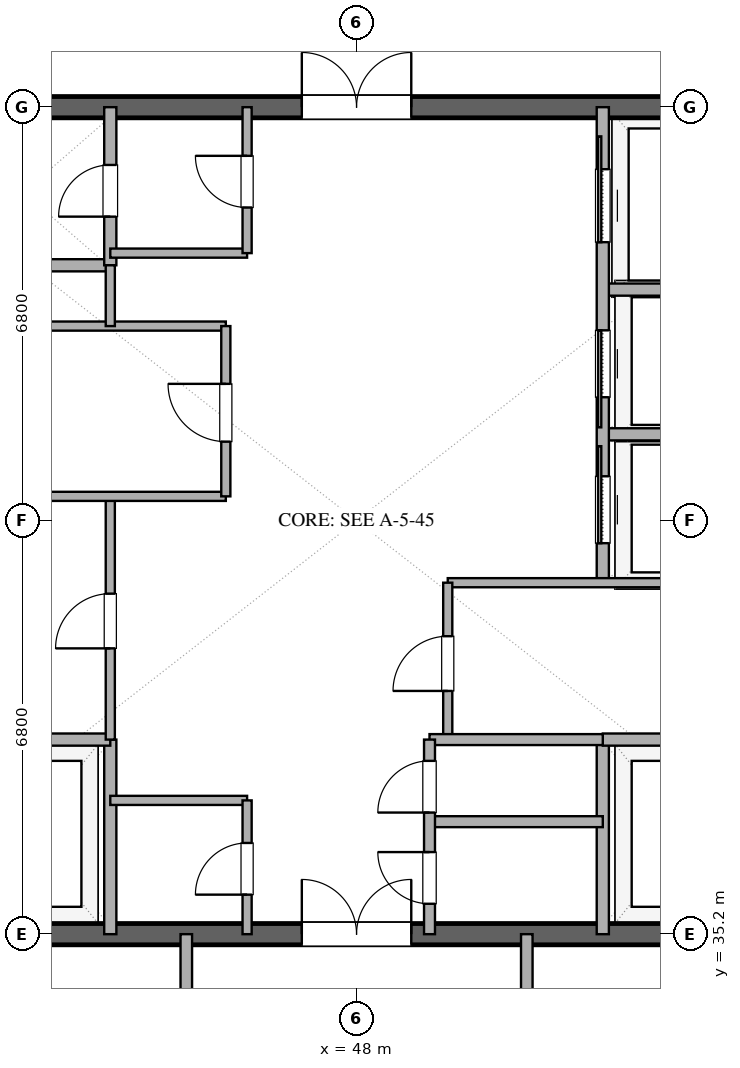
"""IFC4 building model, lengths in metres.
Left out: names, types, materials, properties, quantities, classifications, styles, units other than length and angle.
Written with IfcOpenShell. Run it as: python <this file> out.ifc"""

import sys

from ifc_helpers import new_model, si_unit, direction, frame, frame_2d, origin, place, context, subcontext, project, spatial, rectangle, extrude, element, fill, save


model = new_model("IFC4")
c1 = context("Model", 3, precision=1e-05, world=origin(), true_north=direction((0.0, 1.0)))
c2 = subcontext(c1, "Body", "Model", "MODEL_VIEW")
j1 = project(units=[si_unit("LENGTHUNIT", "METRE"), si_unit("PLANEANGLEUNIT", "RADIAN")], contexts=[c1])
p1 = place(None, origin())
s1 = spatial("IfcSite", under=j1, at=p1, CompositionType="ELEMENT")
p2 = place(p1, origin())
s2 = spatial("IfcBuilding", under=s1, at=p2, CompositionType="ELEMENT")
p3 = place(p2, frame((0.0, 0.0, 312.6)))
s3 = spatial("IfcBuildingStorey", under=s2, at=p3, CompositionType="ELEMENT", Elevation=312.6)
p4 = place(p3, frame((41.0, 35.2, 0.0), z_axis=(0.0, 0.0, 1.0), x_axis=(1.0, 0.0, 0.0)))
e1 = element("IfcWall", 1, at=p4, inside=s3, PredefinedType="SHEAR", context=c2, shape_type="SweptSolid", body=[
    extrude(rectangle(XDim=14.0, YDim=0.35, at=frame_2d((7.0, 0.0))), origin(), (0.0, 0.0, 1.0), 3.64),
])
p5 = place(p4, frame((6.1, 0.0, 0.0)))
e2 = element("IfcOpeningElement", 2, at=p5, cuts=e1, PredefinedType="OPENING", context=c2, shape_type="SweptSolid", body=[
    extrude(rectangle(XDim=1.8, YDim=2.25, at=frame_2d((0.9, 1.125))), frame((0.0, 0.185, 0.0), z_axis=(0.0, -1.0, 0.0), x_axis=(1.0, 0.0, 0.0)), (0.0, 0.0, 1.0), 0.37),
])
p6 = place(p3, frame((41.0, 48.8, 0.0), z_axis=(0.0, 0.0, 1.0), x_axis=(1.0, 0.0, 0.0)))
e3 = element("IfcWall", 3, at=p6, inside=s3, PredefinedType="SHEAR", context=c2, shape_type="SweptSolid", body=[
    extrude(rectangle(XDim=14.0, YDim=0.35, at=frame_2d((7.0, 0.0))), origin(), (0.0, 0.0, 1.0), 3.64),
])
p7 = place(p6, frame((6.1, 0.0, 0.0)))
e4 = element("IfcOpeningElement", 4, at=p7, cuts=e3, PredefinedType="OPENING", context=c2, shape_type="SweptSolid", body=[
    extrude(rectangle(XDim=1.8, YDim=2.25, at=frame_2d((0.9, 1.125))), frame((0.0, 0.185, 0.0), z_axis=(0.0, -1.0, 0.0), x_axis=(1.0, 0.0, 0.0)), (0.0, 0.0, 1.0), 0.37),
])
p8 = place(p3, frame((43.95, 35.2, 0.0), z_axis=(0.0, 0.0, 1.0), x_axis=(0.0, 1.0, 0.0)))
e5 = element("IfcWall", 5, at=p8, inside=s3, PredefinedType="SOLIDWALL", context=c2, shape_type="SweptSolid", body=[
    extrude(rectangle(XDim=3.2, YDim=0.2, at=frame_2d((1.6, 0.0))), origin(), (0.0, 0.0, 1.0), 2.34),
])
p9 = place(p3, frame((41.0, 38.4, 0.0), z_axis=(0.0, 0.0, 1.0), x_axis=(1.0, 0.0, 0.0)))
e6 = element("IfcWall", 6, at=p9, inside=s3, PredefinedType="SOLIDWALL", context=c2, shape_type="SweptSolid", body=[
    extrude(rectangle(XDim=2.95, YDim=0.2, at=frame_2d((1.475, 0.0))), origin(), (0.0, 0.0, 1.0), 2.34),
])
p10 = place(p3, frame((52.05, 35.2, 0.0), z_axis=(0.0, 0.0, 1.0), x_axis=(0.0, 1.0, 0.0)))
e7 = element("IfcWall", 7, at=p10, inside=s3, PredefinedType="SOLIDWALL", context=c2, shape_type="SweptSolid", body=[
    extrude(rectangle(XDim=3.2, YDim=0.2, at=frame_2d((1.6, 0.0))), origin(), (0.0, 0.0, 1.0), 2.34),
])
for number, where, z_axis, x_axis in (
    (8, (52.05, 38.4, 0.0), (0.0, 0.0, 1.0), (1.0, 0.0, 0.0)),
    (9, (41.0, 46.2, 0.0), (0.0, 0.0, 1.0), (1.0, 0.0, 0.0)),
):
    element("IfcWall", number, at=place(p3, frame(where, z_axis=z_axis, x_axis=x_axis)), inside=s3, PredefinedType="SOLIDWALL", context=c2, shape_type="SweptSolid", body=[
        extrude(rectangle(XDim=2.95, YDim=0.2, at=frame_2d((1.475, 0.0))), origin(), (0.0, 0.0, 1.0), 2.34),
    ])
p11 = place(p3, frame((43.95, 46.2, 0.0), z_axis=(0.0, 0.0, 1.0), x_axis=(0.0, 1.0, 0.0)))
e10 = element("IfcWall", 10, at=p11, inside=s3, PredefinedType="SOLIDWALL", context=c2, shape_type="SweptSolid", body=[
    extrude(rectangle(XDim=2.6, YDim=0.2, at=frame_2d((1.3, 0.0))), origin(), (0.0, 0.0, 1.0), 2.34),
])
p12 = place(p11, frame((0.8, 0.0, 0.0)))
e11 = element("IfcOpeningElement", 11, at=p12, cuts=e10, PredefinedType="OPENING", context=c2, shape_type="SweptSolid", body=[
    extrude(rectangle(XDim=0.85, YDim=2.15, at=frame_2d((0.425, 1.075))), frame((0.0, 0.11, 0.0), z_axis=(0.0, -1.0, 0.0), x_axis=(1.0, 0.0, 0.0)), (0.0, 0.0, 1.0), 0.22),
])
p13 = place(p3, frame((43.95, 38.4, 0.0), z_axis=(0.0, 0.0, 1.0), x_axis=(0.0, 1.0, 0.0)))
e12 = element("IfcWall", 12, at=p13, inside=s3, PredefinedType="PARTITIONING", context=c2, shape_type="SweptSolid", body=[
    extrude(rectangle(XDim=4.0, YDim=0.15, at=frame_2d((2.0, 0.0))), origin(), (0.0, 0.0, 1.0), 2.34),
])
p14 = place(p13, frame((1.5, 0.0, 0.0)))
e13 = element("IfcOpeningElement", 13, at=p14, cuts=e12, PredefinedType="OPENING", context=c2, shape_type="SweptSolid", body=[
    extrude(rectangle(XDim=0.9, YDim=2.15, at=frame_2d((0.45, 1.075))), frame((0.0, 0.085, 0.0), z_axis=(0.0, -1.0, 0.0), x_axis=(1.0, 0.0, 0.0)), (0.0, 0.0, 1.0), 0.17),
])
p15 = place(p3, frame((41.0, 42.4, 0.0), z_axis=(0.0, 0.0, 1.0), x_axis=(1.0, 0.0, 0.0)))
e14 = element("IfcWall", 14, at=p15, inside=s3, PredefinedType="PARTITIONING", context=c2, shape_type="SweptSolid", body=[
    extrude(rectangle(XDim=4.85, YDim=0.15, at=frame_2d((2.425, 0.0))), origin(), (0.0, 0.0, 1.0), 2.04),
])
p16 = place(p3, frame((41.0, 45.2, 0.0), z_axis=(0.0, 0.0, 1.0), x_axis=(1.0, 0.0, 0.0)))
e15 = element("IfcWall", 15, at=p16, inside=s3, PredefinedType="PARTITIONING", context=c2, shape_type="SweptSolid", body=[
    extrude(rectangle(XDim=4.85, YDim=0.15, at=frame_2d((2.425, 0.0))), origin(), (0.0, 0.0, 1.0), 2.34),
])
p17 = place(p3, frame((43.95, 45.2, 0.0), z_axis=(0.0, 0.0, 1.0), x_axis=(0.0, 1.0, 0.0)))
e16 = element("IfcWall", 16, at=p17, inside=s3, PredefinedType="PARTITIONING", context=c2, shape_type="SweptSolid", body=[
    extrude(rectangle(XDim=1.0, YDim=0.15, at=frame_2d((0.5, 0.0))), origin(), (0.0, 0.0, 1.0), 2.34),
])
p18 = place(p3, frame((45.85, 42.4, 0.0), z_axis=(0.0, 0.0, 1.0), x_axis=(0.0, 1.0, 0.0)))
e17 = element("IfcWall", 17, at=p18, inside=s3, PredefinedType="PARTITIONING", context=c2, shape_type="SweptSolid", body=[
    extrude(rectangle(XDim=2.8, YDim=0.15, at=frame_2d((1.4, 0.0))), origin(), (0.0, 0.0, 1.0), 2.34),
])
p19 = place(p18, frame((0.9, 0.0, 0.0)))
e18 = element("IfcOpeningElement", 18, at=p19, cuts=e17, PredefinedType="OPENING", context=c2, shape_type="SweptSolid", body=[
    extrude(rectangle(XDim=0.95, YDim=2.15, at=frame_2d((0.475, 1.075))), frame((0.0, 0.085, 0.0), z_axis=(0.0, -1.0, 0.0), x_axis=(1.0, 0.0, 0.0)), (0.0, 0.0, 1.0), 0.17),
])
for number, where, z_axis, x_axis in (
    (19, (52.05, 43.42, 0.0), (0.0, 0.0, 1.0), (1.0, 0.0, 0.0)),
    (20, (52.05, 45.8, 0.0), (0.0, 0.0, 1.0), (1.0, 0.0, 0.0)),
):
    element("IfcWall", number, at=place(p3, frame(where, z_axis=z_axis, x_axis=x_axis)), inside=s3, PredefinedType="SOLIDWALL", context=c2, shape_type="SweptSolid", body=[
        extrude(rectangle(XDim=2.95, YDim=0.2, at=frame_2d((1.475, 0.0))), origin(), (0.0, 0.0, 1.0), 2.34),
    ])
p20 = place(p3, frame((52.05, 40.98, 0.0), z_axis=(0.0, 0.0, 1.0), x_axis=(0.0, 1.0, 0.0)))
e21 = element("IfcWall", 21, at=p20, inside=s3, PredefinedType="SOLIDWALL", context=c2, shape_type="SweptSolid", body=[
    extrude(rectangle(XDim=7.82, YDim=0.2, at=frame_2d((3.91, 0.0))), origin(), (0.0, 0.0, 1.0), 2.34),
])
p21 = place(p20, frame((0.65, 0.0, 0.0)))
e22 = element("IfcOpeningElement", 22, at=p21, cuts=e21, PredefinedType="OPENING", context=c2, shape_type="SweptSolid", body=[
    extrude(rectangle(XDim=1.1, YDim=2.2, at=frame_2d((0.55, 1.1))), frame((0.0, 0.11, 0.0), z_axis=(0.0, -1.0, 0.0), x_axis=(1.0, 0.0, 0.0)), (0.0, 0.0, 1.0), 0.22),
])
p22 = place(p20, frame((3.05, 0.0, 0.0)))
e23 = element("IfcOpeningElement", 23, at=p22, cuts=e21, PredefinedType="OPENING", context=c2, shape_type="SweptSolid", body=[
    extrude(rectangle(XDim=1.1, YDim=2.2, at=frame_2d((0.55, 1.1))), frame((0.0, 0.11, 0.0), z_axis=(0.0, -1.0, 0.0), x_axis=(1.0, 0.0, 0.0)), (0.0, 0.0, 1.0), 0.22),
])
p23 = place(p20, frame((5.6, 0.0, 0.0)))
e24 = element("IfcOpeningElement", 24, at=p23, cuts=e21, PredefinedType="OPENING", context=c2, shape_type="SweptSolid", body=[
    extrude(rectangle(XDim=1.2, YDim=2.2, at=frame_2d((0.6, 1.1))), frame((0.0, 0.11, 0.0), z_axis=(0.0, -1.0, 0.0), x_axis=(1.0, 0.0, 0.0)), (0.0, 0.0, 1.0), 0.22),
])
p24 = place(p3, frame((49.5, 40.98, 0.0), z_axis=(0.0, 0.0, 1.0), x_axis=(1.0, 0.0, 0.0)))
e25 = element("IfcWall", 25, at=p24, inside=s3, PredefinedType="PARTITIONING", context=c2, shape_type="SweptSolid", body=[
    extrude(rectangle(XDim=5.5, YDim=0.15, at=frame_2d((2.75, 0.0))), origin(), (0.0, 0.0, 1.0), 2.34),
])
p25 = place(p3, frame((49.5, 38.4, 0.0), z_axis=(0.0, 0.0, 1.0), x_axis=(0.0, 1.0, 0.0)))
e26 = element("IfcWall", 26, at=p25, inside=s3, PredefinedType="PARTITIONING", context=c2, shape_type="SweptSolid", body=[
    extrude(rectangle(XDim=2.58, YDim=0.15, at=frame_2d((1.29, 0.0))), origin(), (0.0, 0.0, 1.0), 2.34),
])
p26 = place(p25, frame((0.8, 0.0, 0.0)))
e27 = element("IfcOpeningElement", 27, at=p26, cuts=e26, PredefinedType="OPENING", context=c2, shape_type="SweptSolid", body=[
    extrude(rectangle(XDim=0.9, YDim=2.15, at=frame_2d((0.45, 1.075))), frame((0.0, 0.085, 0.0), z_axis=(0.0, -1.0, 0.0), x_axis=(1.0, 0.0, 0.0)), (0.0, 0.0, 1.0), 0.17),
])
p27 = place(p3, frame((43.95, 37.4, 0.0), z_axis=(0.0, 0.0, 1.0), x_axis=(1.0, 0.0, 0.0)))
e28 = element("IfcWall", 28, at=p27, inside=s3, PredefinedType="PARTITIONING", context=c2, shape_type="SweptSolid", body=[
    extrude(rectangle(XDim=2.25, YDim=0.15, at=frame_2d((1.125, 0.0))), origin(), (0.0, 0.0, 1.0), 2.34),
])
p28 = place(p3, frame((46.2, 35.2, 0.0), z_axis=(0.0, 0.0, 1.0), x_axis=(0.0, 1.0, 0.0)))
e29 = element("IfcWall", 29, at=p28, inside=s3, PredefinedType="PARTITIONING", context=c2, shape_type="SweptSolid", body=[
    extrude(rectangle(XDim=2.2, YDim=0.15, at=frame_2d((1.1, 0.0))), origin(), (0.0, 0.0, 1.0), 2.34),
])
p29 = place(p28, frame((0.65, 0.0, 0.0)))
e30 = element("IfcOpeningElement", 30, at=p29, cuts=e29, PredefinedType="OPENING", context=c2, shape_type="SweptSolid", body=[
    extrude(rectangle(XDim=0.85, YDim=2.15, at=frame_2d((0.425, 1.075))), frame((0.0, 0.085, 0.0), z_axis=(0.0, -1.0, 0.0), x_axis=(1.0, 0.0, 0.0)), (0.0, 0.0, 1.0), 0.17),
])
p30 = place(p3, frame((43.95, 46.4, 0.0), z_axis=(0.0, 0.0, 1.0), x_axis=(1.0, 0.0, 0.0)))
e31 = element("IfcWall", 31, at=p30, inside=s3, PredefinedType="PARTITIONING", context=c2, shape_type="SweptSolid", body=[
    extrude(rectangle(XDim=2.25, YDim=0.15, at=frame_2d((1.125, 0.0))), origin(), (0.0, 0.0, 1.0), 2.34),
])
p31 = place(p3, frame((46.2, 46.4, 0.0), z_axis=(0.0, 0.0, 1.0), x_axis=(0.0, 1.0, 0.0)))
e32 = element("IfcWall", 32, at=p31, inside=s3, PredefinedType="PARTITIONING", context=c2, shape_type="SweptSolid", body=[
    extrude(rectangle(XDim=2.4, YDim=0.15, at=frame_2d((1.2, 0.0))), origin(), (0.0, 0.0, 1.0), 2.34),
])
p32 = place(p31, frame((0.75, 0.0, 0.0)))
e33 = element("IfcOpeningElement", 33, at=p32, cuts=e32, PredefinedType="OPENING", context=c2, shape_type="SweptSolid", body=[
    extrude(rectangle(XDim=0.85, YDim=2.15, at=frame_2d((0.425, 1.075))), frame((0.0, 0.085, 0.0), z_axis=(0.0, -1.0, 0.0), x_axis=(1.0, 0.0, 0.0)), (0.0, 0.0, 1.0), 0.17),
])
for number, where, z_axis, x_axis in (
    (34, (49.2, 37.05, 0.0), (0.0, 0.0, 1.0), (1.0, 0.0, 0.0)),
    (35, (49.2, 38.4, 0.0), (0.0, 0.0, 1.0), (1.0, 0.0, 0.0)),
):
    element("IfcWall", number, at=place(p3, frame(where, z_axis=z_axis, x_axis=x_axis)), inside=s3, PredefinedType="PLUMBINGWALL", context=c2, shape_type="SweptSolid", body=[
        extrude(rectangle(XDim=2.85, YDim=0.18, at=frame_2d((1.425, 0.0))), origin(), (0.0, 0.0, 1.0), 2.34),
    ])
p33 = place(p3, frame((49.2, 35.2, 0.0), z_axis=(0.0, 0.0, 1.0), x_axis=(0.0, 1.0, 0.0)))
e36 = element("IfcWall", 36, at=p33, inside=s3, PredefinedType="PLUMBINGWALL", context=c2, shape_type="SweptSolid", body=[
    extrude(rectangle(XDim=3.2, YDim=0.18, at=frame_2d((1.6, 0.0))), origin(), (0.0, 0.0, 1.0), 2.34),
])
p34 = place(p33, frame((0.5, 0.0, 0.0)))
e37 = element("IfcOpeningElement", 37, at=p34, cuts=e36, PredefinedType="OPENING", context=c2, shape_type="SweptSolid", body=[
    extrude(rectangle(XDim=0.85, YDim=2.1, at=frame_2d((0.425, 1.05))), frame((0.0, 0.1, 0.0), z_axis=(0.0, -1.0, 0.0), x_axis=(1.0, 0.0, 0.0)), (0.0, 0.0, 1.0), 0.2),
])
p35 = place(p33, frame((2.0, 0.0, 0.0)))
e38 = element("IfcOpeningElement", 38, at=p35, cuts=e36, PredefinedType="OPENING", context=c2, shape_type="SweptSolid", body=[
    extrude(rectangle(XDim=0.85, YDim=2.15, at=frame_2d((0.425, 1.075))), frame((0.0, 0.1, 0.0), z_axis=(0.0, -1.0, 0.0), x_axis=(1.0, 0.0, 0.0)), (0.0, 0.0, 1.0), 0.2),
])
for number, where, z_axis, x_axis in (
    (39, (45.2, 33.1, 0.0), (0.0, 0.0, 1.0), (0.0, 1.0, 0.0)),
    (40, (50.8, 35.2, 0.0), (0.0, 0.0, 1.0), (0.0, -1.0, 0.0)),
):
    element("IfcWall", number, at=place(p3, frame(where, z_axis=z_axis, x_axis=x_axis)), inside=s3, PredefinedType="PARTITIONING", context=c2, shape_type="SweptSolid", body=[
        extrude(rectangle(XDim=2.1, YDim=0.19, at=frame_2d((1.05, 0.0))), origin(), (0.0, 0.0, 1.0), 2.34),
    ])
p36 = place(p5, origin())
e41 = element("IfcDoor", 41, at=p36, inside=s3, OperationType="DOUBLE_DOOR_SINGLE_SWING", PredefinedType="DOOR", context=c2, shape_type="SweptSolid", body=[
    extrude(rectangle(XDim=1.8, YDim=2.25, at=frame_2d((0.9, 1.125))), frame((0.0, 0.025, 0.0), z_axis=(0.0, -1.0, 0.0), x_axis=(1.0, 0.0, 0.0)), (0.0, 0.0, 1.0), 0.05),
])
fill(e2, e41)
p37 = place(p7, origin())
e42 = element("IfcDoor", 42, at=p37, inside=s3, OperationType="DOUBLE_DOOR_SINGLE_SWING", PredefinedType="DOOR", context=c2, shape_type="SweptSolid", body=[
    extrude(rectangle(XDim=1.8, YDim=2.25, at=frame_2d((0.9, 1.125))), frame((0.0, 0.025, 0.0), z_axis=(0.0, -1.0, 0.0), x_axis=(1.0, 0.0, 0.0)), (0.0, 0.0, 1.0), 0.05),
])
fill(e4, e42)
p38 = place(p12, origin())
e43 = element("IfcDoor", 43, at=p38, inside=s3, OperationType="SINGLE_SWING_LEFT", PredefinedType="DOOR", context=c2, shape_type="SweptSolid", body=[
    extrude(rectangle(XDim=0.85, YDim=2.15, at=frame_2d((0.425, 1.075))), frame((0.0, 0.025, 0.0), z_axis=(0.0, -1.0, 0.0), x_axis=(1.0, 0.0, 0.0)), (0.0, 0.0, 1.0), 0.05),
])
fill(e11, e43)
p39 = place(p14, origin())
e44 = element("IfcDoor", 44, at=p39, inside=s3, OperationType="SINGLE_SWING_LEFT", PredefinedType="DOOR", context=c2, shape_type="SweptSolid", body=[
    extrude(rectangle(XDim=0.9, YDim=2.15, at=frame_2d((0.45, 1.075))), frame((0.0, 0.025, 0.0), z_axis=(0.0, -1.0, 0.0), x_axis=(1.0, 0.0, 0.0)), (0.0, 0.0, 1.0), 0.05),
])
fill(e13, e44)
p40 = place(p19, origin())
e45 = element("IfcDoor", 45, at=p40, inside=s3, OperationType="SINGLE_SWING_RIGHT", PredefinedType="DOOR", context=c2, shape_type="SweptSolid", body=[
    extrude(rectangle(XDim=0.95, YDim=2.15, at=frame_2d((0.475, 1.075))), frame((0.0, 0.025, 0.0), z_axis=(0.0, -1.0, 0.0), x_axis=(1.0, 0.0, 0.0)), (0.0, 0.0, 1.0), 0.05),
])
fill(e18, e45)
p41 = place(p21, origin())
e46 = element("IfcDoor", 46, at=p41, inside=s3, OperationType="SLIDING_TO_RIGHT", PredefinedType="DOOR", context=c2, shape_type="SweptSolid", body=[
    extrude(rectangle(XDim=1.1, YDim=2.2, at=frame_2d((0.55, 1.1))), frame((0.0, 0.025, 0.0), z_axis=(0.0, -1.0, 0.0), x_axis=(1.0, 0.0, 0.0)), (0.0, 0.0, 1.0), 0.05),
])
fill(e22, e46)
p42 = place(p22, origin())
e47 = element("IfcDoor", 47, at=p42, inside=s3, OperationType="SLIDING_TO_LEFT", PredefinedType="DOOR", context=c2, shape_type="SweptSolid", body=[
    extrude(rectangle(XDim=1.1, YDim=2.2, at=frame_2d((0.55, 1.1))), frame((0.0, 0.025, 0.0), z_axis=(0.0, -1.0, 0.0), x_axis=(1.0, 0.0, 0.0)), (0.0, 0.0, 1.0), 0.05),
])
fill(e23, e47)
p43 = place(p23, origin())
e48 = element("IfcDoor", 48, at=p43, inside=s3, OperationType="SLIDING_TO_RIGHT", PredefinedType="DOOR", context=c2, shape_type="SweptSolid", body=[
    extrude(rectangle(XDim=1.2, YDim=2.2, at=frame_2d((0.6, 1.1))), frame((0.0, 0.025, 0.0), z_axis=(0.0, -1.0, 0.0), x_axis=(1.0, 0.0, 0.0)), (0.0, 0.0, 1.0), 0.05),
])
fill(e24, e48)
p44 = place(p26, origin())
e49 = element("IfcDoor", 49, at=p44, inside=s3, OperationType="SINGLE_SWING_LEFT", PredefinedType="DOOR", context=c2, shape_type="SweptSolid", body=[
    extrude(rectangle(XDim=0.9, YDim=2.15, at=frame_2d((0.45, 1.075))), frame((0.0, 0.025, 0.0), z_axis=(0.0, -1.0, 0.0), x_axis=(1.0, 0.0, 0.0)), (0.0, 0.0, 1.0), 0.05),
])
fill(e27, e49)
p45 = place(p29, origin())
e50 = element("IfcDoor", 50, at=p45, inside=s3, OperationType="SINGLE_SWING_LEFT", PredefinedType="DOOR", context=c2, shape_type="SweptSolid", body=[
    extrude(rectangle(XDim=0.85, YDim=2.15, at=frame_2d((0.425, 1.075))), frame((0.0, 0.025, 0.0), z_axis=(0.0, -1.0, 0.0), x_axis=(1.0, 0.0, 0.0)), (0.0, 0.0, 1.0), 0.05),
])
fill(e30, e50)
p46 = place(p32, origin())
e51 = element("IfcDoor", 51, at=p46, inside=s3, OperationType="SINGLE_SWING_RIGHT", PredefinedType="DOOR", context=c2, shape_type="SweptSolid", body=[
    extrude(rectangle(XDim=0.85, YDim=2.15, at=frame_2d((0.425, 1.075))), frame((0.0, 0.025, 0.0), z_axis=(0.0, -1.0, 0.0), x_axis=(1.0, 0.0, 0.0)), (0.0, 0.0, 1.0), 0.05),
])
fill(e33, e51)
p47 = place(p34, origin())
e52 = element("IfcDoor", 52, at=p47, inside=s3, OperationType="SINGLE_SWING_RIGHT", PredefinedType="DOOR", context=c2, shape_type="SweptSolid", body=[
    extrude(rectangle(XDim=0.85, YDim=2.1, at=frame_2d((0.425, 1.05))), frame((0.0, 0.025, 0.0), z_axis=(0.0, -1.0, 0.0), x_axis=(1.0, 0.0, 0.0)), (0.0, 0.0, 1.0), 0.05),
])
fill(e37, e52)
p48 = place(p35, origin())
e53 = element("IfcDoor", 53, at=p48, inside=s3, OperationType="SINGLE_SWING_LEFT", PredefinedType="DOOR", context=c2, shape_type="SweptSolid", body=[
    extrude(rectangle(XDim=0.85, YDim=2.15, at=frame_2d((0.425, 1.075))), frame((0.0, 0.025, 0.0), z_axis=(0.0, -1.0, 0.0), x_axis=(1.0, 0.0, 0.0)), (0.0, 0.0, 1.0), 0.05),
])
fill(e38, e53)
save(model, sys.argv[1])
